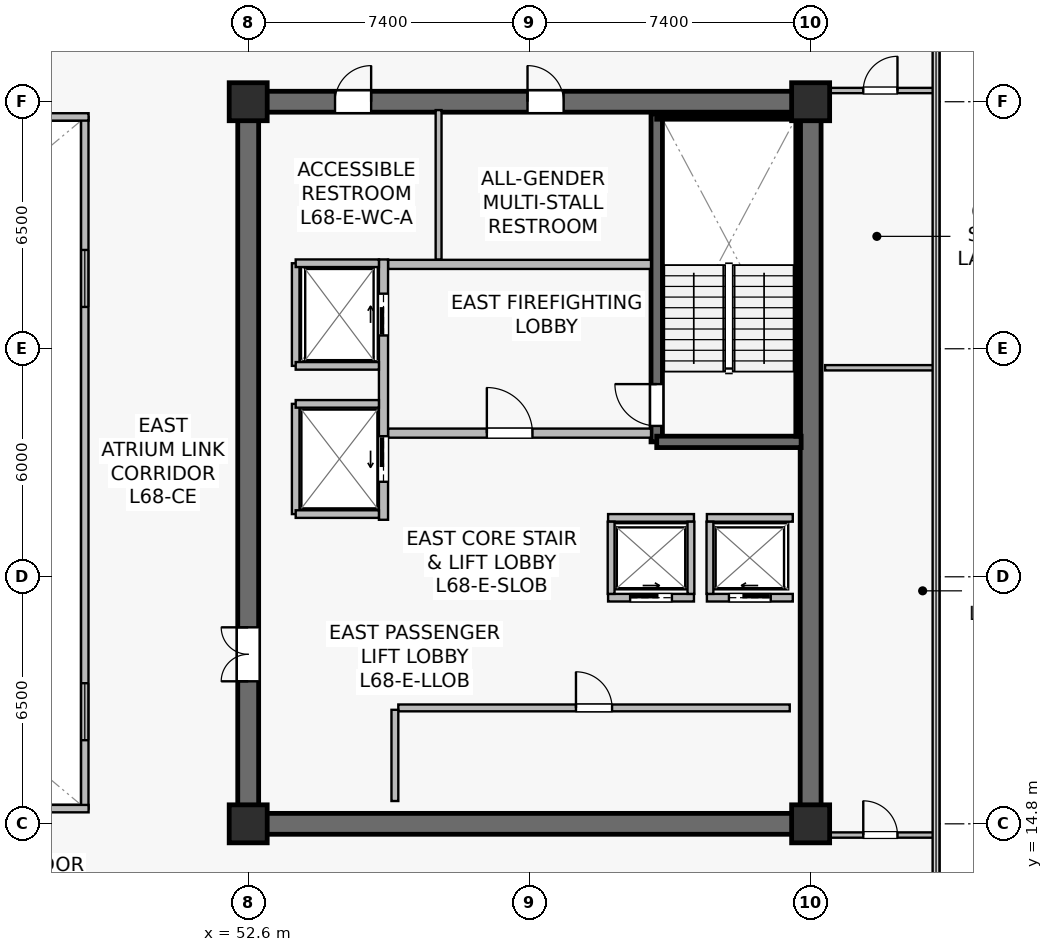
"""IFC4 building model, lengths in metres.
Left out: names, types, materials, properties, quantities, classifications, styles, units other than length and angle.
Written with IfcOpenShell. Run it as: python <this file> out.ifc"""

import sys

from ifc_helpers import new_model, si_unit, direction, frame, frame_2d, origin, origin_2d, place, context, subcontext, project, spatial, rectangle, extrude, source, transform, mapped, element, fill, save


model = new_model("IFC4")
c1 = context("Model", 3, precision=1e-05, world=origin(), true_north=direction((0.0, 1.0)))
c2 = subcontext(c1, "Body", "Model", "MODEL_VIEW")
j1 = project(units=[si_unit("LENGTHUNIT", "METRE"), si_unit("PLANEANGLEUNIT", "RADIAN")], contexts=[c1])
p1 = place(None, origin())
s1 = spatial("IfcSite", under=j1, at=p1, CompositionType="ELEMENT")
p2 = place(p1, origin())
s2 = spatial("IfcBuilding", under=s1, at=p2, CompositionType="ELEMENT")
p3 = place(p2, frame((0.0, 0.0, 283.4)))
s3 = spatial("IfcBuildingStorey", under=s2, at=p3, CompositionType="ELEMENT", Elevation=283.4)
p4 = place(p3, frame((52.325, 14.8, 0.0), z_axis=(0.0, 0.0, 1.0), x_axis=(1.0, 0.0, 0.0)))
e1 = element("IfcWall", 1, at=p4, inside=s3, PredefinedType="SHEAR", context=c2, shape_type="SweptSolid", body=[
    extrude(rectangle(XDim=15.35, YDim=0.55, at=frame_2d((7.675, 0.0))), origin(), (0.0, 0.0, 1.0), 3.8),
])
p5 = place(p3, frame((52.325, 33.8, 0.0), z_axis=(0.0, 0.0, 1.0), x_axis=(1.0, 0.0, 0.0)))
e2 = element("IfcWall", 2, at=p5, inside=s3, PredefinedType="SHEAR", context=c2, shape_type="SweptSolid", body=[
    extrude(rectangle(XDim=15.35, YDim=0.55, at=frame_2d((7.675, 0.0))), origin(), (0.0, 0.0, 1.0), 3.8),
])
p6 = place(p5, frame((7.625, 0.0, 0.0)))
e3 = element("IfcOpeningElement", 3, at=p6, cuts=e2, PredefinedType="OPENING", context=c2, shape_type="SweptSolid", body=[
    extrude(rectangle(XDim=0.95, YDim=2.15, at=frame_2d((0.475, 1.075))), frame((0.0, 0.285, 0.0), z_axis=(0.0, -1.0, 0.0), x_axis=(1.0, 0.0, 0.0)), (0.0, 0.0, 1.0), 0.57),
])
p7 = place(p5, frame((2.56, 0.0, 0.0)))
e4 = element("IfcOpeningElement", 4, at=p7, cuts=e2, PredefinedType="OPENING", context=c2, shape_type="SweptSolid", body=[
    extrude(rectangle(XDim=0.95, YDim=2.15, at=frame_2d((0.475, 1.075))), frame((0.0, 0.285, 0.0), z_axis=(0.0, -1.0, 0.0), x_axis=(1.0, 0.0, 0.0)), (0.0, 0.0, 1.0), 0.57),
])
p8 = place(p3, frame((52.6, 15.075, 0.0), z_axis=(0.0, 0.0, 1.0), x_axis=(0.0, 1.0, 0.0)))
e5 = element("IfcWall", 5, at=p8, inside=s3, PredefinedType="SHEAR", context=c2, shape_type="SweptSolid", body=[
    extrude(rectangle(XDim=18.45, YDim=0.55, at=frame_2d((9.225, 0.0))), origin(), (0.0, 0.0, 1.0), 3.8),
])
p9 = place(p8, frame((3.475, 0.0, 0.0)))
e6 = element("IfcOpeningElement", 6, at=p9, cuts=e5, PredefinedType="OPENING", context=c2, shape_type="SweptSolid", body=[
    extrude(rectangle(XDim=1.42, YDim=2.2, at=frame_2d((0.71, 1.1))), frame((0.0, 0.285, 0.0), z_axis=(0.0, -1.0, 0.0), x_axis=(1.0, 0.0, 0.0)), (0.0, 0.0, 1.0), 0.57),
])
p10 = place(p3, frame((67.4, 15.075, 0.0), z_axis=(0.0, 0.0, 1.0), x_axis=(0.0, 1.0, 0.0)))
e7 = element("IfcWall", 7, at=p10, inside=s3, PredefinedType="SHEAR", context=c2, shape_type="SweptSolid", body=[
    extrude(rectangle(XDim=18.45, YDim=0.55, at=frame_2d((9.225, 0.0))), origin(), (0.0, 0.0, 1.0), 3.8),
])
p11 = place(p3, frame((63.35, 24.85, 0.0), z_axis=(0.0, 0.0, 1.0), x_axis=(0.0, 1.0, 0.0)))
e8 = element("IfcWall", 8, at=p11, inside=s3, PredefinedType="SHEAR", context=c2, shape_type="SweptSolid", body=[
    extrude(rectangle(XDim=8.63, YDim=0.3, at=frame_2d((4.315, 0.0))), origin(), (0.0, 0.0, 1.0), 3.8),
])
p12 = place(p11, frame((0.42, 0.0, 0.0)))
e9 = element("IfcOpeningElement", 9, at=p12, cuts=e8, PredefinedType="OPENING", context=c2, shape_type="SweptSolid", body=[
    extrude(rectangle(XDim=1.1, YDim=2.15, at=frame_2d((0.55, 1.075))), frame((0.0, 0.16, 0.0), z_axis=(0.0, -1.0, 0.0), x_axis=(1.0, 0.0, 0.0)), (0.0, 0.0, 1.0), 0.32),
])
p13 = place(p3, frame((63.35, 24.85, 0.0), z_axis=(0.0, 0.0, 1.0), x_axis=(1.0, 0.0, 0.0)))
e10 = element("IfcWall", 10, at=p13, inside=s3, PredefinedType="SHEAR", context=c2, shape_type="SweptSolid", body=[
    extrude(rectangle(XDim=3.8, YDim=0.3, at=frame_2d((1.9, 0.0))), origin(), (0.0, 0.0, 1.0), 3.8),
])
p14 = place(p3, frame((63.35, 33.4, 0.0), z_axis=(0.0, 0.0, 1.0), x_axis=(1.0, 0.0, 0.0)))
e11 = element("IfcWall", 11, at=p14, inside=s3, PredefinedType="SOLIDWALL", context=c2, shape_type="SweptSolid", body=[
    extrude(rectangle(XDim=3.72, YDim=0.12, at=frame_2d((1.86, 0.0))), origin(), (0.0, 0.0, 1.0), 3.8),
])
p15 = place(p3, frame((67.07, 25.0, 0.0), z_axis=(0.0, 0.0, 1.0), x_axis=(0.0, 1.0, 0.0)))
e12 = element("IfcWall", 12, at=p15, inside=s3, PredefinedType="SOLIDWALL", context=c2, shape_type="SweptSolid", body=[
    extrude(rectangle(XDim=8.32, YDim=0.12, at=frame_2d((4.16, 0.0))), origin(), (0.0, 0.0, 1.0), 3.8),
])
m1 = source(origin(), c2, "Body", "SweptSolid", [
    extrude(rectangle(XDim=1.0, YDim=1.0, at=origin_2d()), origin(), (0.0, 0.0, 1.0), 4.1),
])
for number, where, z_axis, x_axis in (
    (13, (52.6, 14.8, 0.0), (0.0, 0.0, 1.0), (1.0, 0.0, 0.0)),
    (14, (67.4, 14.8, 0.0), (0.0, 0.0, 1.0), (1.0, 0.0, 0.0)),
    (15, (52.6, 33.8, 0.0), (0.0, 0.0, 1.0), (1.0, 0.0, 0.0)),
    (16, (67.4, 33.8, 0.0), (0.0, 0.0, 1.0), (1.0, 0.0, 0.0)),
):
    element("IfcColumn", number, at=place(p3, frame(where, z_axis=z_axis, x_axis=x_axis)), inside=s3, PredefinedType="COLUMN", context=c2, shape_type="MappedRepresentation", body=[
        mapped(m1, transform((0.0, 0.0, 0.0), scale=1.0)),
    ])
p16 = place(p3, frame((56.28, 25.08, 0.0), z_axis=(0.0, 0.0, 1.0), x_axis=(1.0, 0.0, 0.0)))
e17 = element("IfcWall", 17, at=p16, inside=s3, PredefinedType="SOLIDWALL", context=c2, shape_type="SweptSolid", body=[
    extrude(rectangle(XDim=6.92, YDim=0.24, at=frame_2d((3.46, 0.0))), origin(), (0.0, 0.0, 1.0), 3.197),
])
p17 = place(p16, frame((2.6, 0.0, 0.0)))
e18 = element("IfcOpeningElement", 18, at=p17, cuts=e17, PredefinedType="OPENING", context=c2, shape_type="SweptSolid", body=[
    extrude(rectangle(XDim=1.2, YDim=2.16, at=frame_2d((0.6, 1.08))), frame((0.0, 0.13, 0.0), z_axis=(0.0, -1.0, 0.0), x_axis=(1.0, 0.0, 0.0)), (0.0, 0.0, 1.0), 0.26),
])
p18 = place(p3, frame((56.28, 29.52, 0.0), z_axis=(0.0, 0.0, 1.0), x_axis=(1.0, 0.0, 0.0)))
e19 = element("IfcWall", 19, at=p18, inside=s3, PredefinedType="SOLIDWALL", context=c2, shape_type="SweptSolid", body=[
    extrude(rectangle(XDim=6.92, YDim=0.24, at=frame_2d((3.46, 0.0))), origin(), (0.0, 0.0, 1.0), 3.197),
])
p19 = place(p3, frame((56.16, 22.8, 0.0), z_axis=(0.0, 0.0, 1.0), x_axis=(0.0, 1.0, 0.0)))
e20 = element("IfcWall", 20, at=p19, inside=s3, PredefinedType="SOLIDWALL", context=c2, shape_type="SweptSolid", body=[
    extrude(rectangle(XDim=6.85, YDim=0.24, at=frame_2d((3.425, 0.0))), origin(), (0.0, 0.0, 1.0), 2.935),
])
p20 = place(p19, frame((4.85, 0.0, 0.0)))
e21 = element("IfcOpeningElement", 21, at=p20, cuts=e20, PredefinedType="OPENING", context=c2, shape_type="SweptSolid", body=[
    extrude(rectangle(XDim=1.1, YDim=2.22, at=frame_2d((0.55, 1.11))), frame((0.0, 0.13, 0.0), z_axis=(0.0, -1.0, 0.0), x_axis=(1.0, 0.0, 0.0)), (0.0, 0.0, 1.0), 0.26),
])
p21 = place(p19, frame((1.0, 0.0, 0.0)))
e22 = element("IfcOpeningElement", 22, at=p21, cuts=e20, PredefinedType="OPENING", context=c2, shape_type="SweptSolid", body=[
    extrude(rectangle(XDim=1.2, YDim=2.22, at=frame_2d((0.6, 1.11))), frame((0.0, 0.13, 0.0), z_axis=(0.0, -1.0, 0.0), x_axis=(1.0, 0.0, 0.0)), (0.0, 0.0, 1.0), 0.26),
])
p22 = place(p3, frame((64.67, 20.75, 0.0), z_axis=(0.0, 0.0, 1.0), x_axis=(1.0, 0.0, 0.0)))
e23 = element("IfcWall", 23, at=p22, inside=s3, PredefinedType="SOLIDWALL", context=c2, shape_type="SweptSolid", body=[
    extrude(rectangle(XDim=2.26, YDim=0.2, at=frame_2d((1.13, 0.0))), origin(), (0.0, 0.0, 1.0), 3.8),
])
p23 = place(p22, frame((0.58, 0.0, 0.0)))
e24 = element("IfcOpeningElement", 24, at=p23, cuts=e23, PredefinedType="OPENING", context=c2, shape_type="SweptSolid", body=[
    extrude(rectangle(XDim=1.1, YDim=2.22, at=frame_2d((0.55, 1.11))), frame((0.0, 0.11, 0.0), z_axis=(0.0, -1.0, 0.0), x_axis=(1.0, 0.0, 0.0)), (0.0, 0.0, 1.0), 0.22),
])
p24 = place(p3, frame((64.67, 22.85, 0.0), z_axis=(0.0, 0.0, 1.0), x_axis=(1.0, 0.0, 0.0)))
e25 = element("IfcWall", 25, at=p24, inside=s3, PredefinedType="SOLIDWALL", context=c2, shape_type="SweptSolid", body=[
    extrude(rectangle(XDim=2.26, YDim=0.2, at=frame_2d((1.13, 0.0))), origin(), (0.0, 0.0, 1.0), 3.8),
])
p25 = place(p3, frame((64.75, 20.85, 0.0), z_axis=(0.0, 0.0, 1.0), x_axis=(0.0, 1.0, 0.0)))
e26 = element("IfcWall", 26, at=p25, inside=s3, PredefinedType="SOLIDWALL", context=c2, shape_type="SweptSolid", body=[
    extrude(rectangle(XDim=1.9, YDim=0.18, at=frame_2d((0.95, 0.0))), origin(), (0.0, 0.0, 1.0), 3.8),
])
p26 = place(p3, frame((62.07, 20.75, 0.0), z_axis=(0.0, 0.0, 1.0), x_axis=(1.0, 0.0, 0.0)))
e27 = element("IfcWall", 27, at=p26, inside=s3, PredefinedType="SOLIDWALL", context=c2, shape_type="SweptSolid", body=[
    extrude(rectangle(XDim=2.26, YDim=0.2, at=frame_2d((1.13, 0.0))), origin(), (0.0, 0.0, 1.0), 3.8),
])
p27 = place(p26, frame((0.58, 0.0, 0.0)))
e28 = element("IfcOpeningElement", 28, at=p27, cuts=e27, PredefinedType="OPENING", context=c2, shape_type="SweptSolid", body=[
    extrude(rectangle(XDim=1.1, YDim=2.22, at=frame_2d((0.55, 1.11))), frame((0.0, 0.11, 0.0), z_axis=(0.0, -1.0, 0.0), x_axis=(1.0, 0.0, 0.0)), (0.0, 0.0, 1.0), 0.22),
])
p28 = place(p3, frame((62.07, 22.85, 0.0), z_axis=(0.0, 0.0, 1.0), x_axis=(1.0, 0.0, 0.0)))
e29 = element("IfcWall", 29, at=p28, inside=s3, PredefinedType="SOLIDWALL", context=c2, shape_type="SweptSolid", body=[
    extrude(rectangle(XDim=2.26, YDim=0.2, at=frame_2d((1.13, 0.0))), origin(), (0.0, 0.0, 1.0), 3.8),
])
for number, where, z_axis, x_axis in (
    (30, (62.15, 20.85, 0.0), (0.0, 0.0, 1.0), (0.0, 1.0, 0.0)),
    (31, (64.25, 20.85, 0.0), (0.0, 0.0, 1.0), (0.0, 1.0, 0.0)),
):
    element("IfcWall", number, at=place(p3, frame(where, z_axis=z_axis, x_axis=x_axis)), inside=s3, PredefinedType="SOLIDWALL", context=c2, shape_type="SweptSolid", body=[
        extrude(rectangle(XDim=1.9, YDim=0.18, at=frame_2d((0.95, 0.0))), origin(), (0.0, 0.0, 1.0), 3.8),
    ])
p29 = place(p3, frame((53.85, 26.85, 0.0), z_axis=(0.0, 0.0, 1.0), x_axis=(0.0, 1.0, 0.0)))
e32 = element("IfcWall", 32, at=p29, inside=s3, PredefinedType="SOLIDWALL", context=c2, shape_type="SweptSolid", body=[
    extrude(rectangle(XDim=2.7, YDim=0.2, at=frame_2d((1.35, 0.0))), origin(), (0.0, 0.0, 1.0), 3.8),
])
p30 = place(p3, frame((53.85, 29.55, 0.0), z_axis=(0.0, 0.0, 1.0), x_axis=(1.0, 0.0, 0.0)))
e33 = element("IfcWall", 33, at=p30, inside=s3, PredefinedType="SOLIDWALL", context=c2, shape_type="SweptSolid", body=[
    extrude(rectangle(XDim=2.19, YDim=0.2, at=frame_2d((1.095, 0.0))), origin(), (0.0, 0.0, 1.0), 3.8),
])
p31 = place(p3, frame((53.85, 26.85, 0.0), z_axis=(0.0, 0.0, 1.0), x_axis=(1.0, 0.0, 0.0)))
e34 = element("IfcWall", 34, at=p31, inside=s3, PredefinedType="SOLIDWALL", context=c2, shape_type="SweptSolid", body=[
    extrude(rectangle(XDim=2.19, YDim=0.2, at=frame_2d((1.095, 0.0))), origin(), (0.0, 0.0, 1.0), 3.197),
])
p32 = place(p3, frame((53.85, 22.95, 0.0), z_axis=(0.0, 0.0, 1.0), x_axis=(0.0, 1.0, 0.0)))
e35 = element("IfcWall", 35, at=p32, inside=s3, PredefinedType="SOLIDWALL", context=c2, shape_type="SweptSolid", body=[
    extrude(rectangle(XDim=2.9, YDim=0.2, at=frame_2d((1.45, 0.0))), origin(), (0.0, 0.0, 1.0), 2.935),
])
for number, where, z_axis, x_axis in (
    (36, (53.85, 25.85, 0.0), (0.0, 0.0, 1.0), (1.0, 0.0, 0.0)),
    (37, (53.85, 22.95, 0.0), (0.0, 0.0, 1.0), (1.0, 0.0, 0.0)),
):
    element("IfcWall", number, at=place(p3, frame(where, z_axis=z_axis, x_axis=x_axis)), inside=s3, PredefinedType="SOLIDWALL", context=c2, shape_type="SweptSolid", body=[
        extrude(rectangle(XDim=2.19, YDim=0.2, at=frame_2d((1.095, 0.0))), origin(), (0.0, 0.0, 1.0), 3.8),
    ])
p33 = place(p3, frame((56.55, 17.85, 0.0), z_axis=(0.0, 0.0, 1.0), x_axis=(1.0, 0.0, 0.0)))
e38 = element("IfcWall", 38, at=p33, inside=s3, PredefinedType="SOLIDWALL", context=c2, shape_type="SweptSolid", body=[
    extrude(rectangle(XDim=10.3, YDim=0.18, at=frame_2d((5.15, 0.0))), origin(), (0.0, 0.0, 1.0), 3.197),
])
p34 = place(p33, frame((4.675, 0.0, 0.0)))
e39 = element("IfcOpeningElement", 39, at=p34, cuts=e38, PredefinedType="OPENING", context=c2, shape_type="SweptSolid", body=[
    extrude(rectangle(XDim=0.95, YDim=2.15, at=frame_2d((0.475, 1.075))), frame((0.0, 0.1, 0.0), z_axis=(0.0, -1.0, 0.0), x_axis=(1.0, 0.0, 0.0)), (0.0, 0.0, 1.0), 0.2),
])
p35 = place(p3, frame((56.46, 15.4, 0.0), z_axis=(0.0, 0.0, 1.0), x_axis=(0.0, 1.0, 0.0)))
e40 = element("IfcWall", 40, at=p35, inside=s3, PredefinedType="SOLIDWALL", context=c2, shape_type="SweptSolid", body=[
    extrude(rectangle(XDim=2.4, YDim=0.18, at=frame_2d((1.2, 0.0))), origin(), (0.0, 0.0, 1.0), 3.8),
])
p36 = place(p3, frame((57.61, 29.65, 0.0), z_axis=(0.0, 0.0, 1.0), x_axis=(0.0, 1.0, 0.0)))
e41 = element("IfcWall", 41, at=p36, inside=s3, PredefinedType="PLUMBINGWALL", context=c2, shape_type="SweptSolid", body=[
    extrude(rectangle(XDim=3.93, YDim=0.155, at=frame_2d((1.965, 0.0))), origin(), (0.0, 0.0, 1.0), 3.8),
])
p37 = place(p3, frame((48.3, 15.2, 0.0), z_axis=(0.0, 0.0, 1.0), x_axis=(0.0, 1.0, 0.0)))
e42 = element("IfcWall", 42, at=p37, inside=s3, PredefinedType="SOLIDWALL", context=c2, shape_type="SweptSolid", body=[
    extrude(rectangle(XDim=18.2, YDim=0.195, at=frame_2d((9.1, 0.0))), origin(), (0.0, 0.0, 1.0), 3.8),
])
p38 = place(p37, frame((1.8, 0.0, 0.9)))
e43 = element("IfcOpeningElement", 43, at=p38, cuts=e42, PredefinedType="OPENING", context=c2, shape_type="SweptSolid", body=[
    extrude(rectangle(XDim=1.5, YDim=1.4, at=frame_2d((0.75, 0.7))), frame((0.0, 0.107, 0.0), z_axis=(0.0, -1.0, 0.0), x_axis=(1.0, 0.0, 0.0)), (0.0, 0.0, 1.0), 0.215),
])
p39 = place(p37, frame((13.2, 0.0, 0.9)))
e44 = element("IfcOpeningElement", 44, at=p39, cuts=e42, PredefinedType="OPENING", context=c2, shape_type="SweptSolid", body=[
    extrude(rectangle(XDim=1.5, YDim=1.4, at=frame_2d((0.75, 0.7))), frame((0.0, 0.107, 0.0), z_axis=(0.0, -1.0, 0.0), x_axis=(1.0, 0.0, 0.0)), (0.0, 0.0, 1.0), 0.215),
])
for number, where, z_axis, x_axis in (
    (45, (26.4, 15.2, 0.0), (0.0, 0.0, 1.0), (1.0, 0.0, 0.0)),
    (46, (26.4, 33.4, 0.0), (0.0, 0.0, 1.0), (1.0, 0.0, 0.0)),
):
    element("IfcWall", number, at=place(p3, frame(where, z_axis=z_axis, x_axis=x_axis)), inside=s3, PredefinedType="SOLIDWALL", context=c2, shape_type="SweptSolid", body=[
        extrude(rectangle(XDim=22.0, YDim=0.195, at=frame_2d((11.0, 0.0))), origin(), (0.0, 0.0, 1.0), 3.8),
    ])
p40 = place(p3, frame((67.78, 26.8, 0.0), z_axis=(0.0, 0.0, 1.0), x_axis=(1.0, 0.0, 0.0)))
e47 = element("IfcWall", 47, at=p40, inside=s3, PredefinedType="PARTITIONING", context=c2, shape_type="SweptSolid", body=[
    extrude(rectangle(XDim=2.91, YDim=0.14, at=frame_2d((1.455, 0.0))), origin(), (0.0, 0.0, 1.0), 3.8),
])
p41 = place(p3, frame((67.78, 14.505, 0.0), z_axis=(0.0, 0.0, 1.0), x_axis=(1.0, 0.0, 0.0)))
e48 = element("IfcWall", 48, at=p41, inside=s3, PredefinedType="PARTITIONING", context=c2, shape_type="SweptSolid", body=[
    extrude(rectangle(XDim=2.91, YDim=0.14, at=frame_2d((1.455, 0.0))), origin(), (0.0, 0.0, 1.0), 3.8),
])
p42 = place(p41, frame((1.005, 0.0, 0.0)))
e49 = element("IfcOpeningElement", 49, at=p42, cuts=e48, PredefinedType="OPENING", context=c2, shape_type="SweptSolid", body=[
    extrude(rectangle(XDim=0.9, YDim=2.1, at=frame_2d((0.45, 1.05))), frame((0.0, 0.08, 0.0), z_axis=(0.0, -1.0, 0.0), x_axis=(1.0, 0.0, 0.0)), (0.0, 0.0, 1.0), 0.16),
])
p43 = place(p3, frame((67.78, 34.095, 0.0), z_axis=(0.0, 0.0, 1.0), x_axis=(1.0, 0.0, 0.0)))
e50 = element("IfcWall", 50, at=p43, inside=s3, PredefinedType="PARTITIONING", context=c2, shape_type="SweptSolid", body=[
    extrude(rectangle(XDim=2.91, YDim=0.14, at=frame_2d((1.455, 0.0))), origin(), (0.0, 0.0, 1.0), 3.8),
])
p44 = place(p43, frame((1.005, 0.0, 0.0)))
e51 = element("IfcOpeningElement", 51, at=p44, cuts=e50, PredefinedType="OPENING", context=c2, shape_type="SweptSolid", body=[
    extrude(rectangle(XDim=0.9, YDim=2.1, at=frame_2d((0.45, 1.05))), frame((0.0, 0.08, 0.0), z_axis=(0.0, -1.0, 0.0), x_axis=(1.0, 0.0, 0.0)), (0.0, 0.0, 1.0), 0.16),
])
m2 = source(origin(), c2, "Body", "SweptSolid", [
    extrude(rectangle(XDim=1.5, YDim=1.4, at=frame_2d((0.75, 0.7))), frame((0.0, 0.03, 0.0), z_axis=(0.0, -1.0, 0.0), x_axis=(1.0, 0.0, 0.0)), (0.0, 0.0, 1.0), 0.06),
])
p45 = place(p38, origin())
e52 = element("IfcWindow", 52, at=p45, inside=s3, PartitioningType="SINGLE_PANEL", PredefinedType="WINDOW", context=c2, shape_type="MappedRepresentation", body=[
    mapped(m2, transform((0.0, 0.0, 0.0), scale=1.0)),
])
fill(e43, e52)
p46 = place(p39, origin())
e53 = element("IfcWindow", 53, at=p46, inside=s3, PartitioningType="SINGLE_PANEL", PredefinedType="WINDOW", context=c2, shape_type="MappedRepresentation", body=[
    mapped(m2, transform((0.0, 0.0, 0.0), scale=1.0)),
])
fill(e44, e53)
m3 = source(origin(), c2, "Body", "SweptSolid", [
    extrude(rectangle(XDim=1.1, YDim=2.15, at=frame_2d((0.55, 1.075))), frame((0.0, 0.025, 0.0), z_axis=(0.0, -1.0, 0.0), x_axis=(1.0, 0.0, 0.0)), (0.0, 0.0, 1.0), 0.05),
])
p47 = place(p12, origin())
e54 = element("IfcDoor", 54, at=p47, inside=s3, OperationType="SINGLE_SWING_RIGHT", PredefinedType="DOOR", context=c2, shape_type="MappedRepresentation", body=[
    mapped(m3, transform((0.0, 0.0, 0.0), scale=1.0)),
])
fill(e9, e54)
m4 = source(origin(), c2, "Body", "SweptSolid", [
    extrude(rectangle(XDim=1.2, YDim=2.16, at=frame_2d((0.6, 1.08))), frame((0.0, 0.025, 0.0), z_axis=(0.0, -1.0, 0.0), x_axis=(1.0, 0.0, 0.0)), (0.0, 0.0, 1.0), 0.05),
])
p48 = place(p17, origin())
e55 = element("IfcDoor", 55, at=p48, inside=s3, OperationType="SINGLE_SWING_LEFT", PredefinedType="DOOR", context=c2, shape_type="MappedRepresentation", body=[
    mapped(m4, transform((0.0, 0.0, 0.0), scale=1.0)),
])
fill(e18, e55)
m5 = source(origin(), c2, "Body", "SweptSolid", [
    extrude(rectangle(XDim=1.1, YDim=2.22, at=frame_2d((0.55, 1.11))), frame((0.0, 0.025, 0.0), z_axis=(0.0, -1.0, 0.0), x_axis=(1.0, 0.0, 0.0)), (0.0, 0.0, 1.0), 0.05),
])
p49 = place(p23, origin())
e56 = element("IfcDoor", 56, at=p49, inside=s3, OperationType="SLIDING_TO_LEFT", PredefinedType="USERDEFINED", context=c2, shape_type="MappedRepresentation", body=[
    mapped(m5, transform((0.0, 0.0, 0.0), scale=1.0)),
])
fill(e24, e56)
p50 = place(p27, origin())
e57 = element("IfcDoor", 57, at=p50, inside=s3, OperationType="SLIDING_TO_RIGHT", PredefinedType="USERDEFINED", context=c2, shape_type="MappedRepresentation", body=[
    mapped(m5, transform((0.0, 0.0, 0.0), scale=1.0)),
])
fill(e28, e57)
p51 = place(p20, origin())
e58 = element("IfcDoor", 58, at=p51, inside=s3, OperationType="SLIDING_TO_RIGHT", PredefinedType="USERDEFINED", context=c2, shape_type="MappedRepresentation", body=[
    mapped(m5, transform((0.0, 0.0, 0.0), scale=1.0)),
])
fill(e21, e58)
m6 = source(origin(), c2, "Body", "SweptSolid", [
    extrude(rectangle(XDim=1.2, YDim=2.22, at=frame_2d((0.6, 1.11))), frame((0.0, 0.025, 0.0), z_axis=(0.0, -1.0, 0.0), x_axis=(1.0, 0.0, 0.0)), (0.0, 0.0, 1.0), 0.05),
])
p52 = place(p21, origin())
e59 = element("IfcDoor", 59, at=p52, inside=s3, OperationType="SLIDING_TO_LEFT", PredefinedType="USERDEFINED", context=c2, shape_type="MappedRepresentation", body=[
    mapped(m6, transform((0.0, 0.0, 0.0), scale=1.0)),
])
fill(e22, e59)
m7 = source(origin(), c2, "Body", "SweptSolid", [
    extrude(rectangle(XDim=0.95, YDim=2.15, at=frame_2d((0.475, 1.075))), frame((0.0, 0.025, 0.0), z_axis=(0.0, -1.0, 0.0), x_axis=(1.0, 0.0, 0.0)), (0.0, 0.0, 1.0), 0.05),
])
p53 = place(p34, origin())
e60 = element("IfcDoor", 60, at=p53, inside=s3, OperationType="SINGLE_SWING_LEFT", PredefinedType="DOOR", context=c2, shape_type="MappedRepresentation", body=[
    mapped(m7, transform((0.0, 0.0, 0.0), scale=1.0)),
])
fill(e39, e60)
m8 = source(origin(), c2, "Body", "SweptSolid", [
    extrude(rectangle(XDim=1.42, YDim=2.2, at=frame_2d((0.71, 1.1))), frame((0.0, 0.025, 0.0), z_axis=(0.0, -1.0, 0.0), x_axis=(1.0, 0.0, 0.0)), (0.0, 0.0, 1.0), 0.05),
])
p54 = place(p9, origin())
e61 = element("IfcDoor", 61, at=p54, inside=s3, OperationType="DOUBLE_DOOR_SINGLE_SWING", PredefinedType="DOOR", context=c2, shape_type="MappedRepresentation", body=[
    mapped(m8, transform((0.0, 0.0, 0.0), scale=1.0)),
])
fill(e6, e61)
p55 = place(p6, origin())
e62 = element("IfcDoor", 62, at=p55, inside=s3, OperationType="SINGLE_SWING_LEFT", PredefinedType="DOOR", context=c2, shape_type="MappedRepresentation", body=[
    mapped(m7, transform((0.0, 0.0, 0.0), scale=1.0)),
])
fill(e3, e62)
p56 = place(p7, origin())
e63 = element("IfcDoor", 63, at=p56, inside=s3, OperationType="SINGLE_SWING_RIGHT", PredefinedType="DOOR", context=c2, shape_type="MappedRepresentation", body=[
    mapped(m7, transform((0.0, 0.0, 0.0), scale=1.0)),
])
fill(e4, e63)
m9 = source(origin(), c2, "Body", "SweptSolid", [
    extrude(rectangle(XDim=0.9, YDim=2.1, at=frame_2d((0.45, 1.05))), frame((0.0, 0.025, 0.0), z_axis=(0.0, -1.0, 0.0), x_axis=(1.0, 0.0, 0.0)), (0.0, 0.0, 1.0), 0.05),
])
p57 = place(p42, origin())
e64 = element("IfcDoor", 64, at=p57, inside=s3, OperationType="SINGLE_SWING_LEFT", PredefinedType="DOOR", context=c2, shape_type="MappedRepresentation", body=[
    mapped(m9, transform((0.0, 0.0, 0.0), scale=1.0)),
])
fill(e49, e64)
p58 = place(p44, origin())
e65 = element("IfcDoor", 65, at=p58, inside=s3, OperationType="SINGLE_SWING_RIGHT", PredefinedType="DOOR", context=c2, shape_type="MappedRepresentation", body=[
    mapped(m9, transform((0.0, 0.0, 0.0), scale=1.0)),
])
fill(e51, e65)
save(model, sys.argv[1])
